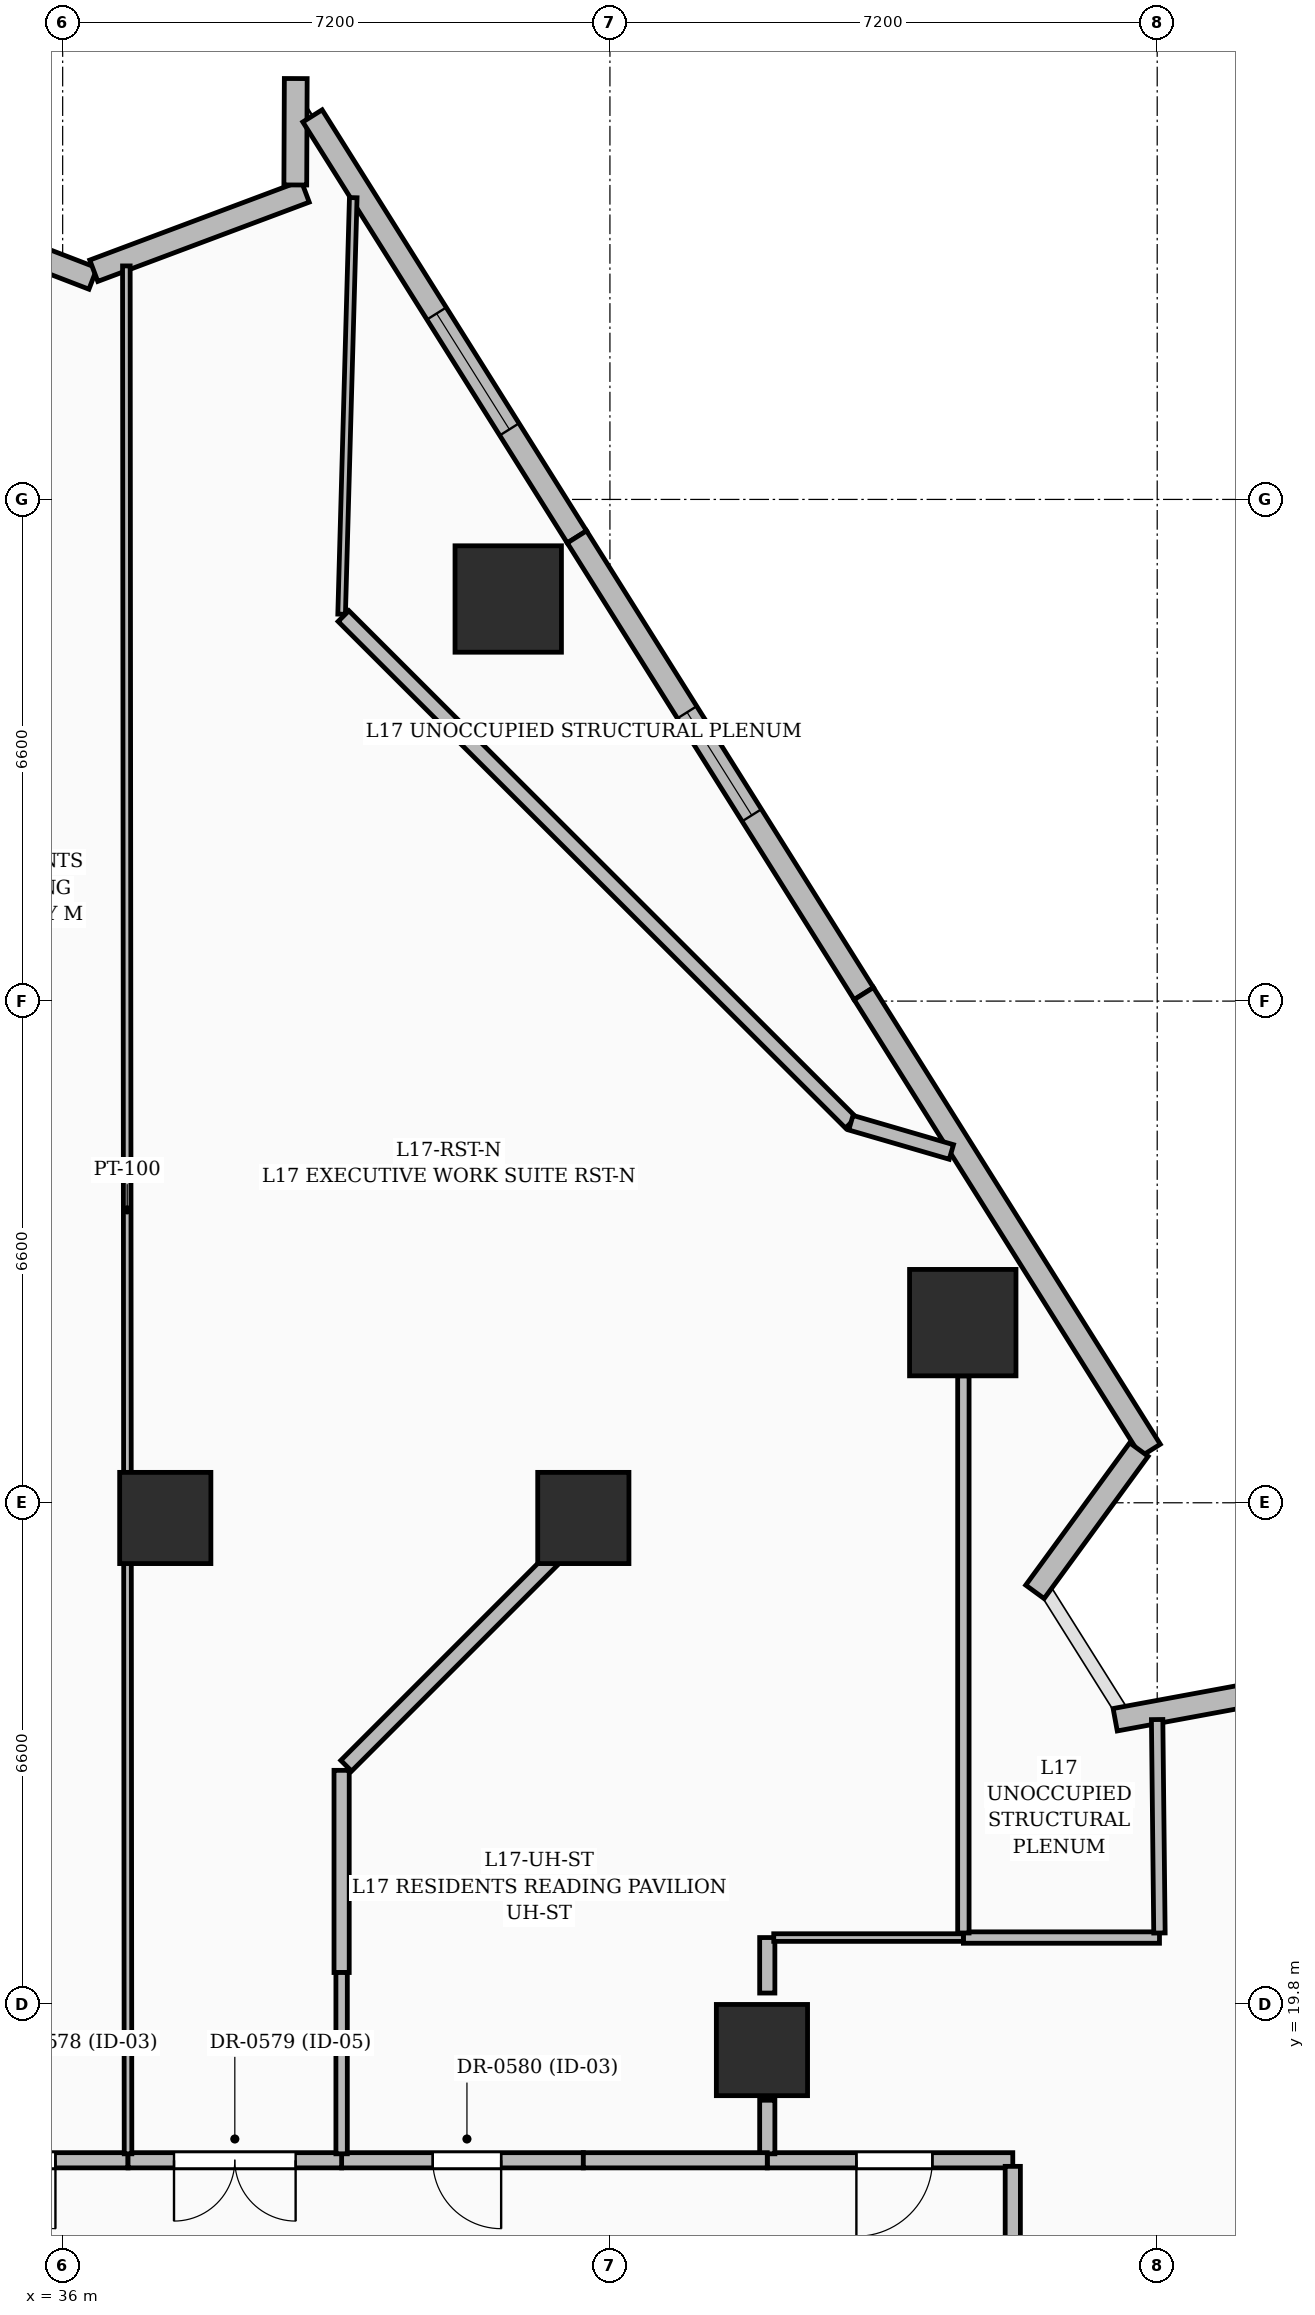
"""IFC4 building model, lengths in metres.
Left out: names, types, materials, properties, quantities, classifications, styles, units other than length and angle.
Written with IfcOpenShell. Run it as: python <this file> out.ifc"""

import sys

from ifc_helpers import new_model, si_unit, direction, frame, frame_2d, origin, origin_2d, place, context, subcontext, project, spatial, rectangle, extrude, element, fill, save


model = new_model("IFC4")
c1 = context("Model", 3, precision=1e-05, world=origin(), true_north=direction((0.0, 1.0)))
c2 = subcontext(c1, "Body", "Model", "MODEL_VIEW")
j1 = project(units=[si_unit("LENGTHUNIT", "METRE"), si_unit("PLANEANGLEUNIT", "RADIAN")], contexts=[c1])
p1 = place(None, origin())
s1 = spatial("IfcSite", under=j1, at=p1, CompositionType="ELEMENT")
p2 = place(p1, origin())
s2 = spatial("IfcBuilding", under=s1, at=p2, CompositionType="ELEMENT")
p3 = place(p2, frame((0.0, 0.0, 71.4)))
s3 = spatial("IfcBuildingStorey", under=s2, at=p3, CompositionType="ELEMENT", Elevation=71.4)
for number, where, z_axis, x_axis in (
    (1, (45.2, 19.2, 0.0), (0.0, 0.0, 1.0), (1.0, 0.0, 0.0)),
    (2, (42.85, 26.2, 0.0), (0.0, 0.0, 1.0), (1.0, 0.0, 0.0)),
    (3, (37.35, 26.2, 0.0), (0.0, 0.0, 1.0), (1.0, 0.0, 0.0)),
):
    element("IfcColumn", number, at=place(p3, frame(where, z_axis=z_axis, x_axis=x_axis)), inside=s3, PredefinedType="COLUMN", context=c2, shape_type="SweptSolid", body=[
        extrude(rectangle(XDim=1.2, YDim=1.2, at=origin_2d()), origin(), (0.0, 0.0, 1.0), 3.6),
    ])
for number, where, z_axis, x_axis in (
    (4, (47.842, 28.77, 0.0), (0.0, 0.0, 1.0), (1.0, 0.0, 0.0)),
    (5, (41.862, 38.29, 0.0), (0.0, 0.0, 1.0), (1.0, 0.0, 0.0)),
):
    element("IfcColumn", number, at=place(p3, frame(where, z_axis=z_axis, x_axis=x_axis)), inside=s3, PredefinedType="COLUMN", context=c2, shape_type="SweptSolid", body=[
        extrude(rectangle(XDim=1.4, YDim=1.4, at=origin_2d()), origin(), (0.0, 0.0, 1.0), 3.6),
    ])
p4 = place(p3, frame((33.614, 43.579, 0.0), z_axis=(0.0, 0.0, 1.0), x_axis=(0.933166321884, -0.359444871576, 0.0)))
e6 = element("IfcWall", 6, at=p4, inside=s3, PredefinedType="SOLIDWALL", context=c2, shape_type="SweptSolid", body=[
    extrude(rectangle(XDim=2.985, YDim=0.3, at=frame_2d((1.493, 0.0))), origin(), (0.0, 0.0, 1.0), 3.35),
])
p5 = place(p4, frame((1.025, 0.0, 0.8)))
e7 = element("IfcOpeningElement", 7, at=p5, cuts=e6, PredefinedType="OPENING", context=c2, shape_type="SweptSolid", body=[
    extrude(rectangle(XDim=1.2, YDim=1.8, at=frame_2d((0.6, 0.9))), frame((0.0, 0.16, 0.0), z_axis=(0.0, -1.0, 0.0), x_axis=(1.0, 0.0, 0.0)), (0.0, 0.0, 1.0), 0.32),
])
p6 = place(p3, frame((36.409, 42.609, 0.0), z_axis=(0.0, 0.0, 1.0), x_axis=(0.936403459864, 0.350925291699, 0.0)))
e8 = element("IfcWall", 8, at=p6, inside=s3, PredefinedType="SOLIDWALL", context=c2, shape_type="SweptSolid", body=[
    extrude(rectangle(XDim=2.971, YDim=0.3, at=frame_2d((1.485, 0.0))), origin(), (0.0, 0.0, 1.0), 3.35),
])
p7 = place(p3, frame((39.061, 43.737, 0.0), z_axis=(0.0, 0.0, 1.0), x_axis=(0.004359916705, 0.999990495518, 0.0)))
e9 = element("IfcWall", 9, at=p7, inside=s3, PredefinedType="SOLIDWALL", context=c2, shape_type="SweptSolid", body=[
    extrude(rectangle(XDim=1.4, YDim=0.3, at=frame_2d((0.7, 0.0))), origin(), (0.0, 0.0, 1.0), 3.35),
])
p8 = place(p3, frame((39.287, 44.646, 0.0), z_axis=(0.0, 0.0, 1.0), x_axis=(0.531900124003, -0.846807096147, 0.0)))
e10 = element("IfcWall", 10, at=p8, inside=s3, PredefinedType="SOLIDWALL", context=c2, shape_type="SweptSolid", body=[
    extrude(rectangle(XDim=6.54, YDim=0.3, at=frame_2d((3.27, 0.0))), origin(), (0.0, 0.0, 1.0), 3.35),
])
p9 = place(p8, frame((3.07, 0.0, 0.6)))
e11 = element("IfcOpeningElement", 11, at=p9, cuts=e10, PredefinedType="OPENING", context=c2, shape_type="SweptSolid", body=[
    extrude(rectangle(XDim=1.8, YDim=2.1, at=frame_2d((0.9, 1.05))), frame((0.0, 0.16, 0.0), z_axis=(0.0, -1.0, 0.0), x_axis=(1.0, 0.0, 0.0)), (0.0, 0.0, 1.0), 0.32),
])
p10 = place(p3, frame((42.765, 39.107, 0.0), z_axis=(0.0, 0.0, 1.0), x_axis=(0.531921360547, -0.846793756586, 0.0)))
e12 = element("IfcWall", 12, at=p10, inside=s3, PredefinedType="SOLIDWALL", context=c2, shape_type="SweptSolid", body=[
    extrude(rectangle(XDim=7.095, YDim=0.3, at=frame_2d((3.548, 0.0))), origin(), (0.0, 0.0, 1.0), 3.35),
])
p11 = place(p10, frame((2.725, 0.0, 0.55)))
e13 = element("IfcOpeningElement", 13, at=p11, cuts=e12, PredefinedType="OPENING", context=c2, shape_type="SweptSolid", body=[
    extrude(rectangle(XDim=1.6, YDim=2.2, at=frame_2d((0.8, 1.1))), frame((0.0, 0.16, 0.0), z_axis=(0.0, -1.0, 0.0), x_axis=(1.0, 0.0, 0.0)), (0.0, 0.0, 1.0), 0.32),
])
p12 = place(p3, frame((46.54, 33.099, 0.0), z_axis=(0.0, 0.0, 1.0), x_axis=(0.531881188868, -0.846818989471, 0.0)))
e14 = element("IfcWall", 14, at=p12, inside=s3, PredefinedType="SOLIDWALL", context=c2, shape_type="SweptSolid", body=[
    extrude(rectangle(XDim=7.095, YDim=0.3, at=frame_2d((3.548, 0.0))), origin(), (0.0, 0.0, 1.0), 3.35),
])
p13 = place(p3, frame((50.159, 27.1, 0.0), z_axis=(0.0, 0.0, 1.0), x_axis=(-0.589910976018, -0.80746829063, 0.0)))
e15 = element("IfcWall", 15, at=p13, inside=s3, PredefinedType="SOLIDWALL", context=c2, shape_type="SweptSolid", body=[
    extrude(rectangle(XDim=2.318, YDim=0.3, at=frame_2d((1.159, 0.0))), origin(), (0.0, 0.0, 1.0), 2.375),
])
p14 = place(p3, frame((49.847, 23.546, 0.0), z_axis=(0.0, 0.0, 1.0), x_axis=(0.98340285181, 0.181435473521, 0.0)))
e16 = element("IfcWall", 16, at=p14, inside=s3, PredefinedType="SOLIDWALL", context=c2, shape_type="SweptSolid", body=[
    extrude(rectangle(XDim=2.594, YDim=0.3, at=frame_2d((1.297, 0.0))), origin(), (0.0, 0.0, 1.0), 2.375),
])
p15 = place(p3, frame((42.85, 17.75, 0.0), z_axis=(0.0, 0.0, 1.0), x_axis=(-1.0, 0.0, 0.0)))
e17 = element("IfcWall", 17, at=p15, inside=s3, PredefinedType="PARTITIONING", context=c2, shape_type="SweptSolid", body=[
    extrude(rectangle(XDim=3.18, YDim=0.2, at=frame_2d((1.59, 0.0))), origin(), (0.0, 0.0, 1.0), 3.35),
])
p16 = place(p15, frame((1.081, 0.0, 0.0)))
e18 = element("IfcOpeningElement", 18, at=p16, cuts=e17, PredefinedType="OPENING", context=c2, shape_type="SweptSolid", body=[
    extrude(rectangle(XDim=0.9, YDim=2.1, at=frame_2d((0.45, 1.05))), frame((0.0, 0.11, 0.0), z_axis=(0.0, -1.0, 0.0), x_axis=(1.0, 0.0, 0.0)), (0.0, 0.0, 1.0), 0.22),
])
p17 = place(p3, frame((48.5, 17.75, 0.0), z_axis=(0.0, 0.0, 1.0), x_axis=(-1.0, 0.0, 0.0)))
e19 = element("IfcWall", 19, at=p17, inside=s3, PredefinedType="PARTITIONING", context=c2, shape_type="SweptSolid", body=[
    extrude(rectangle(XDim=3.23, YDim=0.2, at=frame_2d((1.615, 0.0))), origin(), (0.0, 0.0, 1.0), 2.309),
])
p18 = place(p17, frame((1.058, 0.0, 0.0)))
e20 = element("IfcOpeningElement", 20, at=p18, cuts=e19, PredefinedType="OPENING", context=c2, shape_type="SweptSolid", body=[
    extrude(rectangle(XDim=1.0, YDim=2.2, at=frame_2d((0.5, 1.1))), frame((0.0, 0.11, 0.0), z_axis=(0.0, -1.0, 0.0), x_axis=(1.0, 0.0, 0.0)), (0.0, 0.0, 1.0), 0.22),
])
p19 = place(p3, frame((36.86, 17.75, 0.0), z_axis=(0.0, 0.0, 1.0), x_axis=(-1.0, 0.0, 0.0)))
e21 = element("IfcWall", 21, at=p19, inside=s3, PredefinedType="PARTITIONING", context=c2, shape_type="SweptSolid", body=[
    extrude(rectangle(XDim=2.81, YDim=0.2, at=frame_2d((1.405, 0.0))), origin(), (0.0, 0.0, 1.0), 2.309),
])
p20 = place(p19, frame((0.955, 0.0, 0.0)))
e22 = element("IfcOpeningElement", 22, at=p20, cuts=e21, PredefinedType="OPENING", context=c2, shape_type="SweptSolid", body=[
    extrude(rectangle(XDim=0.9, YDim=2.1, at=frame_2d((0.45, 1.05))), frame((0.0, 0.11, 0.0), z_axis=(0.0, -1.0, 0.0), x_axis=(1.0, 0.0, 0.0)), (0.0, 0.0, 1.0), 0.22),
])
p21 = place(p3, frame((39.67, 17.75, 0.0), z_axis=(0.0, 0.0, 1.0), x_axis=(-1.0, 0.0, 0.0)))
e23 = element("IfcWall", 23, at=p21, inside=s3, PredefinedType="PARTITIONING", context=c2, shape_type="SweptSolid", body=[
    extrude(rectangle(XDim=2.81, YDim=0.2, at=frame_2d((1.405, 0.0))), origin(), (0.0, 0.0, 1.0), 3.35),
])
p22 = place(p21, frame((0.605, 0.0, 0.0)))
e24 = element("IfcOpeningElement", 24, at=p22, cuts=e23, PredefinedType="OPENING", context=c2, shape_type="SweptSolid", body=[
    extrude(rectangle(XDim=1.6, YDim=2.3, at=frame_2d((0.8, 1.15))), frame((0.0, 0.11, 0.0), z_axis=(0.0, -1.0, 0.0), x_axis=(1.0, 0.0, 0.0)), (0.0, 0.0, 1.0), 0.22),
])
p23 = place(p3, frame((45.27, 19.95, 0.0), z_axis=(0.0, 0.0, 1.0), x_axis=(0.0, 1.0, 0.0)))
e25 = element("IfcWall", 25, at=p23, inside=s3, PredefinedType="PARTITIONING", context=c2, shape_type="SweptSolid", body=[
    extrude(rectangle(XDim=0.73, YDim=0.2, at=frame_2d((0.365, 0.0))), origin(), (0.0, 0.0, 1.0), 1.12),
])
p24 = place(p3, frame((39.67, 22.88, 0.0), z_axis=(0.0, 0.0, 1.0), x_axis=(0.0, -1.0, 0.0)))
e26 = element("IfcWall", 26, at=p24, inside=s3, PredefinedType="PARTITIONING", context=c2, shape_type="SweptSolid", body=[
    extrude(rectangle(XDim=2.66, YDim=0.2, at=frame_2d((1.33, 0.0))), origin(), (0.0, 0.0, 1.0), 3.35),
])
p25 = place(p3, frame((42.85, 26.06, 0.0), z_axis=(0.0, 0.0, 1.0), x_axis=(-0.707134446312, -0.707079114978, 0.0)))
e27 = element("IfcWall", 27, at=p25, inside=s3, PredefinedType="PARTITIONING", context=c2, shape_type="SweptSolid", body=[
    extrude(rectangle(XDim=4.412, YDim=0.2, at=frame_2d((2.206, 0.0))), origin(), (0.0, 0.0, 1.0), 3.35),
])
p26 = place(p3, frame((45.27, 17.835, 0.0), z_axis=(0.0, 0.0, 1.0), x_axis=(0.0, 1.0, 0.0)))
e28 = element("IfcWall", 28, at=p26, inside=s3, PredefinedType="PARTITIONING", context=c2, shape_type="SweptSolid", body=[
    extrude(rectangle(XDim=0.705, YDim=0.2, at=frame_2d((0.353, 0.0))), origin(), (0.0, 0.0, 1.0), 2.309),
])
p27 = place(p3, frame((50.43, 20.68, 0.0), z_axis=(0.0, 0.0, 1.0), x_axis=(-1.0, 0.0, 0.0)))
e29 = element("IfcWall", 29, at=p27, inside=s3, PredefinedType="PARTITIONING", context=c2, shape_type="SweptSolid", body=[
    extrude(rectangle(XDim=2.58, YDim=0.15, at=frame_2d((1.29, 0.0))), origin(), (0.0, 0.0, 1.0), 2.86),
])
p28 = place(p3, frame((47.85, 20.68, 0.0), z_axis=(0.0, 0.0, 1.0), x_axis=(-1.0, 0.0, 0.0)))
e30 = element("IfcWall", 30, at=p28, inside=s3, PredefinedType="PARTITIONING", context=c2, shape_type="SweptSolid", body=[
    extrude(rectangle(XDim=2.495, YDim=0.1, at=frame_2d((1.248, 0.0))), origin(), (0.0, 0.0, 1.0), 1.12),
])
p29 = place(p3, frame((50.429, 20.74, 0.0), z_axis=(0.0, 0.0, 1.0), x_axis=(-0.010867033473, 0.999940952048, 0.0)))
e31 = element("IfcWall", 31, at=p29, inside=s3, PredefinedType="PARTITIONING", context=c2, shape_type="SweptSolid", body=[
    extrude(rectangle(XDim=2.808, YDim=0.15, at=frame_2d((1.404, 0.0))), origin(), (0.0, 0.0, 1.0), 3.35),
])
p30 = place(p3, frame((47.85, 28.07, 0.0), z_axis=(0.0, 0.0, 1.0), x_axis=(0.0, -1.0, 0.0)))
e32 = element("IfcWall", 32, at=p30, inside=s3, PredefinedType="PARTITIONING", context=c2, shape_type="SweptSolid", body=[
    extrude(rectangle(XDim=7.33, YDim=0.15, at=frame_2d((3.665, 0.0))), origin(), (0.0, 0.0, 1.0), 1.12),
])
p31 = place(p3, frame((36.86, 17.835, 0.0), z_axis=(0.0, 0.0, 1.0), x_axis=(-0.000894497986, 0.999999599937, 0.0)))
e33 = element("IfcWall", 33, at=p31, inside=s3, PredefinedType="PARTITIONING", context=c2, shape_type="SweptSolid", body=[
    extrude(rectangle(XDim=24.837, YDim=0.1, at=frame_2d((12.418, 0.0))), origin(), (0.0, 0.0, 1.0), 1.12),
])
p32 = place(p3, frame((39.67, 38.09, 0.0), z_axis=(0.0, 0.0, 1.0), x_axis=(0.027922815714, 0.999610082163, 0.0)))
e34 = element("IfcWall", 34, at=p32, inside=s3, PredefinedType="PARTITIONING", context=c2, shape_type="SweptSolid", body=[
    extrude(rectangle(XDim=5.482, YDim=0.1, at=frame_2d((2.741, 0.0))), origin(), (0.0, 0.0, 1.0), 2.37),
])
p33 = place(p3, frame((46.37, 31.4, 0.0), z_axis=(0.0, 0.0, 1.0), x_axis=(-0.707637141771, 0.70657602251, 0.0)))
e35 = element("IfcWall", 35, at=p33, inside=s3, PredefinedType="PARTITIONING", context=c2, shape_type="SweptSolid", body=[
    extrude(rectangle(XDim=9.433, YDim=0.2, at=frame_2d((4.717, 0.0))), origin(), (0.0, 0.0, 1.0), 1.12),
])
p34 = place(p3, frame((47.692, 31.015, 0.0), z_axis=(0.0, 0.0, 1.0), x_axis=(-0.960099248001, 0.279659496509, 0.0)))
e36 = element("IfcWall", 36, at=p34, inside=s3, PredefinedType="PARTITIONING", context=c2, shape_type="SweptSolid", body=[
    extrude(rectangle(XDim=1.377, YDim=0.2, at=frame_2d((0.688, 0.0))), origin(), (0.0, 0.0, 1.0), 2.37),
])
p35 = place(p3, frame((45.27, 17.75, 0.0), z_axis=(0.0, 0.0, 1.0), x_axis=(-1.0, 0.0, 0.0)))
e37 = element("IfcWall", 37, at=p35, inside=s3, PredefinedType="PARTITIONING", context=c2, shape_type="SweptSolid", body=[
    extrude(rectangle(XDim=2.42, YDim=0.2, at=frame_2d((1.21, 0.0))), origin(), (0.0, 0.0, 1.0), 3.35),
])
p36 = place(p3, frame((48.5, 14.28, 0.0), z_axis=(0.0, 0.0, 1.0), x_axis=(0.0, 1.0, 0.0)))
e38 = element("IfcWall", 38, at=p36, inside=s3, PredefinedType="PARTITIONING", context=c2, shape_type="SweptSolid", body=[
    extrude(rectangle(XDim=3.39, YDim=0.2, at=frame_2d((1.695, 0.0))), origin(), (0.0, 0.0, 1.0), 1.12),
])
p37 = place(p3, frame((39.67, 20.22, 0.0), z_axis=(0.0, 0.0, 1.0), x_axis=(0.0, -1.0, 0.0)))
e39 = element("IfcWall", 39, at=p37, inside=s3, PredefinedType="PARTITIONING", context=c2, shape_type="SweptSolid", body=[
    extrude(rectangle(XDim=2.385, YDim=0.15, at=frame_2d((1.192, 0.0))), origin(), (0.0, 0.0, 1.0), 2.853),
])
p38 = place(p9, origin())
e40 = element("IfcWindow", 40, at=p38, inside=s3, PartitioningType="SINGLE_PANEL", PredefinedType="WINDOW", context=c2, shape_type="SweptSolid", body=[
    extrude(rectangle(XDim=1.8, YDim=2.1, at=frame_2d((0.9, 1.05))), frame((0.0, 0.03, 0.0), z_axis=(0.0, -1.0, 0.0), x_axis=(1.0, 0.0, 0.0)), (0.0, 0.0, 1.0), 0.06),
])
fill(e11, e40)
p39 = place(p11, origin())
e41 = element("IfcWindow", 41, at=p39, inside=s3, PartitioningType="SINGLE_PANEL", PredefinedType="WINDOW", context=c2, shape_type="SweptSolid", body=[
    extrude(rectangle(XDim=1.6, YDim=2.2, at=frame_2d((0.8, 1.1))), frame((0.0, 0.03, 0.0), z_axis=(0.0, -1.0, 0.0), x_axis=(1.0, 0.0, 0.0)), (0.0, 0.0, 1.0), 0.06),
])
fill(e13, e41)
p40 = place(p20, origin())
e42 = element("IfcDoor", 42, at=p40, inside=s3, OperationType="SINGLE_SWING_LEFT", PredefinedType="DOOR", context=c2, shape_type="SweptSolid", body=[
    extrude(rectangle(XDim=0.9, YDim=2.1, at=frame_2d((0.45, 1.05))), frame((0.0, 0.025, 0.0), z_axis=(0.0, -1.0, 0.0), x_axis=(1.0, 0.0, 0.0)), (0.0, 0.0, 1.0), 0.05),
])
fill(e22, e42)
p41 = place(p22, origin())
e43 = element("IfcDoor", 43, at=p41, inside=s3, OperationType="DOUBLE_DOOR_SINGLE_SWING", PredefinedType="DOOR", context=c2, shape_type="SweptSolid", body=[
    extrude(rectangle(XDim=1.6, YDim=2.3, at=frame_2d((0.8, 1.15))), frame((0.0, 0.025, 0.0), z_axis=(0.0, -1.0, 0.0), x_axis=(1.0, 0.0, 0.0)), (0.0, 0.0, 1.0), 0.05),
])
fill(e24, e43)
p42 = place(p16, origin())
e44 = element("IfcDoor", 44, at=p42, inside=s3, OperationType="SINGLE_SWING_LEFT", PredefinedType="DOOR", context=c2, shape_type="SweptSolid", body=[
    extrude(rectangle(XDim=0.9, YDim=2.1, at=frame_2d((0.45, 1.05))), frame((0.0, 0.025, 0.0), z_axis=(0.0, -1.0, 0.0), x_axis=(1.0, 0.0, 0.0)), (0.0, 0.0, 1.0), 0.05),
])
fill(e18, e44)
p43 = place(p18, origin())
e45 = element("IfcDoor", 45, at=p43, inside=s3, OperationType="SINGLE_SWING_RIGHT", PredefinedType="DOOR", context=c2, shape_type="SweptSolid", body=[
    extrude(rectangle(XDim=1.0, YDim=2.2, at=frame_2d((0.5, 1.1))), frame((0.0, 0.025, 0.0), z_axis=(0.0, -1.0, 0.0), x_axis=(1.0, 0.0, 0.0)), (0.0, 0.0, 1.0), 0.05),
])
fill(e20, e45)
save(model, sys.argv[1])
